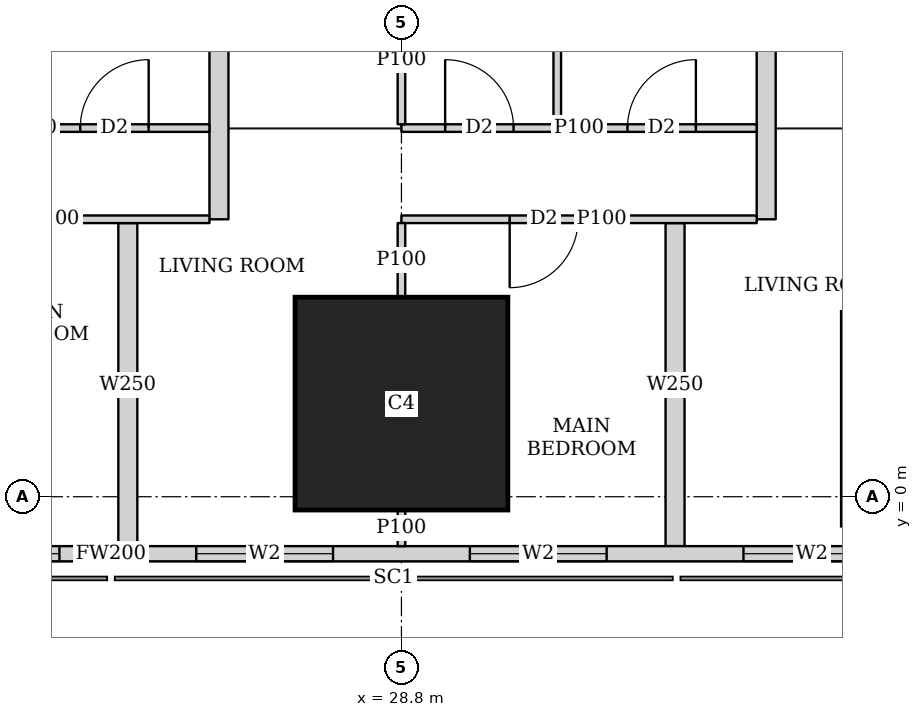
"""IFC4 building model, lengths in metres.
Left out: names, types, materials, properties, quantities, classifications, styles, units other than length and angle.
Written with IfcOpenShell. Run it as: python <this file> out.ifc"""

import sys

from ifc_helpers import new_model, si_unit, direction, frame, frame_2d, origin, origin_2d, place, context, subcontext, project, spatial, rectangle, extrude, element, fill, save


model = new_model("IFC4")
c1 = context("Model", 3, precision=1e-05, world=origin(), true_north=direction((0.0, 1.0)))
c2 = subcontext(c1, "Body", "Model", "MODEL_VIEW")
j1 = project(units=[si_unit("LENGTHUNIT", "METRE"), si_unit("PLANEANGLEUNIT", "RADIAN")], contexts=[c1])
p1 = place(None, origin())
s1 = spatial("IfcSite", under=j1, at=p1, CompositionType="ELEMENT")
p2 = place(p1, origin())
s2 = spatial("IfcBuilding", under=s1, at=p2, CompositionType="ELEMENT")
p3 = place(p2, frame((0.0, 0.0, 68.75)))
s3 = spatial("IfcBuildingStorey", under=s2, at=p3, CompositionType="ELEMENT", Elevation=68.75)
p4 = place(p3, frame((28.8, 1.225, 0.0), z_axis=(0.0, 0.0, 1.0), x_axis=(1.0, 0.0, 0.0)))
e1 = element("IfcColumn", 1, at=p4, inside=s3, PredefinedType="COLUMN", context=c2, shape_type="SweptSolid", body=[
    extrude(rectangle(XDim=2.8, YDim=2.8, at=origin_2d()), origin(), (0.0, 0.0, 1.0), 3.75),
])
p5 = place(p3, frame((2.163, -0.75, 0.0), z_axis=(0.0, 0.0, 1.0), x_axis=(1.0, 0.0, 0.0)))
e2 = element("IfcWall", 2, at=p5, inside=s3, PredefinedType="SOLIDWALL", context=c2, shape_type="SweptSolid", body=[
    extrude(rectangle(XDim=45.628, YDim=0.2, at=frame_2d((22.814, 0.0))), origin(), (0.0, 0.0, 1.0), 3.45),
])
p6 = place(p5, frame((9.537, 0.0, 0.9)))
e3 = element("IfcOpeningElement", 3, at=p6, cuts=e2, PredefinedType="OPENING", context=c2, shape_type="SweptSolid", body=[
    extrude(rectangle(XDim=1.8, YDim=1.5, at=frame_2d((0.9, 0.75))), frame((0.0, 0.11, 0.0), z_axis=(0.0, -1.0, 0.0), x_axis=(1.0, 0.0, 0.0)), (0.0, 0.0, 1.0), 0.22),
])
p7 = place(p5, frame((13.137, 0.0, 0.9)))
e4 = element("IfcOpeningElement", 4, at=p7, cuts=e2, PredefinedType="OPENING", context=c2, shape_type="SweptSolid", body=[
    extrude(rectangle(XDim=1.8, YDim=1.5, at=frame_2d((0.9, 0.75))), frame((0.0, 0.11, 0.0), z_axis=(0.0, -1.0, 0.0), x_axis=(1.0, 0.0, 0.0)), (0.0, 0.0, 1.0), 0.22),
])
p8 = place(p5, frame((16.737, 0.0, 0.9)))
e5 = element("IfcOpeningElement", 5, at=p8, cuts=e2, PredefinedType="OPENING", context=c2, shape_type="SweptSolid", body=[
    extrude(rectangle(XDim=1.8, YDim=1.5, at=frame_2d((0.9, 0.75))), frame((0.0, 0.11, 0.0), z_axis=(0.0, -1.0, 0.0), x_axis=(1.0, 0.0, 0.0)), (0.0, 0.0, 1.0), 0.22),
])
p9 = place(p5, frame((20.337, 0.0, 0.9)))
e6 = element("IfcOpeningElement", 6, at=p9, cuts=e2, PredefinedType="OPENING", context=c2, shape_type="SweptSolid", body=[
    extrude(rectangle(XDim=1.8, YDim=1.5, at=frame_2d((0.9, 0.75))), frame((0.0, 0.11, 0.0), z_axis=(0.0, -1.0, 0.0), x_axis=(1.0, 0.0, 0.0)), (0.0, 0.0, 1.0), 0.22),
])
p10 = place(p5, frame((23.937, 0.0, 0.9)))
e7 = element("IfcOpeningElement", 7, at=p10, cuts=e2, PredefinedType="OPENING", context=c2, shape_type="SweptSolid", body=[
    extrude(rectangle(XDim=1.8, YDim=1.5, at=frame_2d((0.9, 0.75))), frame((0.0, 0.11, 0.0), z_axis=(0.0, -1.0, 0.0), x_axis=(1.0, 0.0, 0.0)), (0.0, 0.0, 1.0), 0.22),
])
p11 = place(p5, frame((27.537, 0.0, 0.9)))
e8 = element("IfcOpeningElement", 8, at=p11, cuts=e2, PredefinedType="OPENING", context=c2, shape_type="SweptSolid", body=[
    extrude(rectangle(XDim=1.8, YDim=1.5, at=frame_2d((0.9, 0.75))), frame((0.0, 0.11, 0.0), z_axis=(0.0, -1.0, 0.0), x_axis=(1.0, 0.0, 0.0)), (0.0, 0.0, 1.0), 0.22),
])
p12 = place(p5, frame((31.137, 0.0, 0.9)))
e9 = element("IfcOpeningElement", 9, at=p12, cuts=e2, PredefinedType="OPENING", context=c2, shape_type="SweptSolid", body=[
    extrude(rectangle(XDim=1.8, YDim=1.5, at=frame_2d((0.9, 0.75))), frame((0.0, 0.11, 0.0), z_axis=(0.0, -1.0, 0.0), x_axis=(1.0, 0.0, 0.0)), (0.0, 0.0, 1.0), 0.22),
])
p13 = place(p5, frame((34.737, 0.0, 0.9)))
e10 = element("IfcOpeningElement", 10, at=p13, cuts=e2, PredefinedType="OPENING", context=c2, shape_type="SweptSolid", body=[
    extrude(rectangle(XDim=1.8, YDim=1.5, at=frame_2d((0.9, 0.75))), frame((0.0, 0.11, 0.0), z_axis=(0.0, -1.0, 0.0), x_axis=(1.0, 0.0, 0.0)), (0.0, 0.0, 1.0), 0.22),
])
p14 = place(p3, frame((33.68, 42.723, 0.0), z_axis=(0.0, 0.0, 1.0), x_axis=(0.185624129307, -0.98262082342, 0.0)))
e11 = element("IfcWall", 11, at=p14, inside=s3, PredefinedType="SOLIDWALL", context=c2, shape_type="SweptSolid", body=[
    extrude(rectangle(XDim=41.051, YDim=0.15, at=frame_2d((20.526, 0.0))), origin(), (0.0, 0.0, 1.0), 2.45),
])
p15 = place(p14, frame((13.577, 0.0, 0.0)))
e12 = element("IfcOpeningElement", 12, at=p15, cuts=e11, PredefinedType="OPENING", context=c2, shape_type="SweptSolid", body=[
    extrude(rectangle(XDim=1.0, YDim=2.1, at=frame_2d((0.5, 1.05))), frame((0.0, 0.085, 0.0), z_axis=(0.0, -1.0, 0.0), x_axis=(1.0, 0.0, 0.0)), (0.0, 0.0, 1.0), 0.17),
])
p16 = place(p14, frame((17.394, 0.0, 0.0)))
e13 = element("IfcOpeningElement", 13, at=p16, cuts=e11, PredefinedType="OPENING", context=c2, shape_type="SweptSolid", body=[
    extrude(rectangle(XDim=1.0, YDim=2.1, at=frame_2d((0.5, 1.05))), frame((0.0, 0.085, 0.0), z_axis=(0.0, -1.0, 0.0), x_axis=(1.0, 0.0, 0.0)), (0.0, 0.0, 1.0), 0.17),
])
p17 = place(p14, frame((26.758, 0.0, 0.0)))
e14 = element("IfcOpeningElement", 14, at=p17, cuts=e11, PredefinedType="OPENING", context=c2, shape_type="SweptSolid", body=[
    extrude(rectangle(XDim=1.0, YDim=2.1, at=frame_2d((0.5, 1.05))), frame((0.0, 0.085, 0.0), z_axis=(0.0, -1.0, 0.0), x_axis=(1.0, 0.0, 0.0)), (0.0, 0.0, 1.0), 0.17),
])
p18 = place(p14, frame((32.193, 0.0, 0.0)))
e15 = element("IfcOpeningElement", 15, at=p18, cuts=e11, PredefinedType="OPENING", context=c2, shape_type="SweptSolid", body=[
    extrude(rectangle(XDim=1.0, YDim=2.1, at=frame_2d((0.5, 1.05))), frame((0.0, 0.085, 0.0), z_axis=(0.0, -1.0, 0.0), x_axis=(1.0, 0.0, 0.0)), (0.0, 0.0, 1.0), 0.17),
])
p19 = place(p3, frame((26.274, 3.65, 0.0), z_axis=(0.0, 0.0, 1.0), x_axis=(-1.0, 0.0, 0.0)))
e16 = element("IfcWall", 16, at=p19, inside=s3, PredefinedType="PARTITIONING", context=c2, shape_type="SweptSolid", body=[
    extrude(rectangle(XDim=4.674, YDim=0.1, at=frame_2d((2.337, 0.0))), origin(), (0.0, 0.0, 1.0), 3.45),
])
p20 = place(p19, frame((2.35, 0.0, 0.0)))
e17 = element("IfcOpeningElement", 17, at=p20, cuts=e16, PredefinedType="OPENING", context=c2, shape_type="SweptSolid", body=[
    extrude(rectangle(XDim=0.9, YDim=2.1, at=frame_2d((0.45, 1.05))), frame((0.0, 0.06, 0.0), z_axis=(0.0, -1.0, 0.0), x_axis=(1.0, 0.0, 0.0)), (0.0, 0.0, 1.0), 0.12),
])
p21 = place(p3, frame((26.274, 4.85, 0.0), z_axis=(0.0, 0.0, 1.0), x_axis=(-1.0, 0.0, 0.0)))
e18 = element("IfcWall", 18, at=p21, inside=s3, PredefinedType="PARTITIONING", context=c2, shape_type="SweptSolid", body=[
    extrude(rectangle(XDim=4.674, YDim=0.1, at=frame_2d((2.337, 0.0))), origin(), (0.0, 0.0, 1.0), 3.45),
])
p22 = place(p21, frame((3.199, 0.0, 0.0)))
e19 = element("IfcOpeningElement", 19, at=p22, cuts=e18, PredefinedType="OPENING", context=c2, shape_type="SweptSolid", body=[
    extrude(rectangle(XDim=0.9, YDim=2.1, at=frame_2d((0.45, 1.05))), frame((0.0, 0.06, 0.0), z_axis=(0.0, -1.0, 0.0), x_axis=(1.0, 0.0, 0.0)), (0.0, 0.0, 1.0), 0.12),
])
p23 = place(p21, frame((0.8, 0.0, 0.0)))
e20 = element("IfcOpeningElement", 20, at=p23, cuts=e18, PredefinedType="OPENING", context=c2, shape_type="SweptSolid", body=[
    extrude(rectangle(XDim=0.9, YDim=2.1, at=frame_2d((0.45, 1.05))), frame((0.0, 0.06, 0.0), z_axis=(0.0, -1.0, 0.0), x_axis=(1.0, 0.0, 0.0)), (0.0, 0.0, 1.0), 0.12),
])
p24 = place(p3, frame((33.474, 3.65, 0.0), z_axis=(0.0, 0.0, 1.0), x_axis=(-1.0, 0.0, 0.0)))
e21 = element("IfcWall", 21, at=p24, inside=s3, PredefinedType="PARTITIONING", context=c2, shape_type="SweptSolid", body=[
    extrude(rectangle(XDim=4.674, YDim=0.1, at=frame_2d((2.337, 0.0))), origin(), (0.0, 0.0, 1.0), 3.45),
])
p25 = place(p24, frame((2.35, 0.0, 0.0)))
e22 = element("IfcOpeningElement", 22, at=p25, cuts=e21, PredefinedType="OPENING", context=c2, shape_type="SweptSolid", body=[
    extrude(rectangle(XDim=0.9, YDim=2.1, at=frame_2d((0.45, 1.05))), frame((0.0, 0.06, 0.0), z_axis=(0.0, -1.0, 0.0), x_axis=(1.0, 0.0, 0.0)), (0.0, 0.0, 1.0), 0.12),
])
p26 = place(p3, frame((33.474, 4.85, 0.0), z_axis=(0.0, 0.0, 1.0), x_axis=(-1.0, 0.0, 0.0)))
e23 = element("IfcWall", 23, at=p26, inside=s3, PredefinedType="PARTITIONING", context=c2, shape_type="SweptSolid", body=[
    extrude(rectangle(XDim=4.674, YDim=0.1, at=frame_2d((2.337, 0.0))), origin(), (0.0, 0.0, 1.0), 3.45),
])
p27 = place(p26, frame((3.199, 0.0, 0.0)))
e24 = element("IfcOpeningElement", 24, at=p27, cuts=e23, PredefinedType="OPENING", context=c2, shape_type="SweptSolid", body=[
    extrude(rectangle(XDim=0.9, YDim=2.1, at=frame_2d((0.45, 1.05))), frame((0.0, 0.06, 0.0), z_axis=(0.0, -1.0, 0.0), x_axis=(1.0, 0.0, 0.0)), (0.0, 0.0, 1.0), 0.12),
])
p28 = place(p26, frame((0.8, 0.0, 0.0)))
e25 = element("IfcOpeningElement", 25, at=p28, cuts=e23, PredefinedType="OPENING", context=c2, shape_type="SweptSolid", body=[
    extrude(rectangle(XDim=0.9, YDim=2.1, at=frame_2d((0.45, 1.05))), frame((0.0, 0.06, 0.0), z_axis=(0.0, -1.0, 0.0), x_axis=(1.0, 0.0, 0.0)), (0.0, 0.0, 1.0), 0.12),
])
p29 = place(p3, frame((28.8, -0.65, 0.0), z_axis=(0.0, 0.0, 1.0), x_axis=(0.0, 1.0, 0.0)))
e26 = element("IfcWall", 26, at=p29, inside=s3, PredefinedType="PARTITIONING", context=c2, shape_type="SweptSolid", body=[
    extrude(rectangle(XDim=0.474, YDim=0.1, at=frame_2d((0.237, 0.0))), origin(), (0.0, 0.0, 1.0), 3.45),
])
p30 = place(p3, frame((28.8, 2.626, 0.0), z_axis=(0.0, 0.0, 1.0), x_axis=(0.0, 1.0, 0.0)))
e27 = element("IfcWall", 27, at=p30, inside=s3, PredefinedType="PARTITIONING", context=c2, shape_type="SweptSolid", body=[
    extrude(rectangle(XDim=0.974, YDim=0.1, at=frame_2d((0.487, 0.0))), origin(), (0.0, 0.0, 1.0), 3.45),
])
p31 = place(p3, frame((28.8, 4.9, 0.0), z_axis=(0.0, 0.0, 1.0), x_axis=(0.0, 1.0, 0.0)))
e28 = element("IfcWall", 28, at=p31, inside=s3, PredefinedType="PARTITIONING", context=c2, shape_type="SweptSolid", body=[
    extrude(rectangle(XDim=1.699, YDim=0.1, at=frame_2d((0.85, 0.0))), origin(), (0.0, 0.0, 1.0), 3.45),
])
p32 = place(p3, frame((30.85, 4.9, 0.0), z_axis=(0.0, 0.0, 1.0), x_axis=(0.0, 1.0, 0.0)))
e29 = element("IfcWall", 29, at=p32, inside=s3, PredefinedType="PARTITIONING", context=c2, shape_type="SweptSolid", body=[
    extrude(rectangle(XDim=3.525, YDim=0.1, at=frame_2d((1.763, 0.0))), origin(), (0.0, 0.0, 1.0), 3.45),
])
p33 = place(p3, frame((25.2, -0.65, 0.0), z_axis=(0.0, 0.0, 1.0), x_axis=(0.0, 1.0, 0.0)))
e30 = element("IfcWall", 30, at=p33, inside=s3, PredefinedType="SOLIDWALL", context=c2, shape_type="SweptSolid", body=[
    extrude(rectangle(XDim=4.25, YDim=0.25, at=frame_2d((2.125, 0.0))), origin(), (0.0, 0.0, 1.0), 2.0),
])
p34 = place(p3, frame((26.399, 3.65, 0.0), z_axis=(0.0, 0.0, 1.0), x_axis=(0.0, 1.0, 0.0)))
e31 = element("IfcWall", 31, at=p34, inside=s3, PredefinedType="SOLIDWALL", context=c2, shape_type="SweptSolid", body=[
    extrude(rectangle(XDim=4.775, YDim=0.25, at=frame_2d((2.388, 0.0))), origin(), (0.0, 0.0, 1.0), 3.45),
])
p35 = place(p3, frame((32.4, -0.65, 0.0), z_axis=(0.0, 0.0, 1.0), x_axis=(0.0, 1.0, 0.0)))
e32 = element("IfcWall", 32, at=p35, inside=s3, PredefinedType="SOLIDWALL", context=c2, shape_type="SweptSolid", body=[
    extrude(rectangle(XDim=4.25, YDim=0.25, at=frame_2d((2.125, 0.0))), origin(), (0.0, 0.0, 1.0), 2.0),
])
p36 = place(p3, frame((33.599, 3.65, 0.0), z_axis=(0.0, 0.0, 1.0), x_axis=(0.0, 1.0, 0.0)))
e33 = element("IfcWall", 33, at=p36, inside=s3, PredefinedType="SOLIDWALL", context=c2, shape_type="SweptSolid", body=[
    extrude(rectangle(XDim=4.775, YDim=0.25, at=frame_2d((2.388, 0.0))), origin(), (0.0, 0.0, 1.0), 3.45),
])
p37 = place(p9, origin())
e34 = element("IfcWindow", 34, at=p37, inside=s3, PartitioningType="SINGLE_PANEL", PredefinedType="WINDOW", context=c2, shape_type="SweptSolid", body=[
    extrude(rectangle(XDim=1.8, YDim=1.5, at=frame_2d((0.9, 0.75))), frame((0.0, 0.03, 0.0), z_axis=(0.0, -1.0, 0.0), x_axis=(1.0, 0.0, 0.0)), (0.0, 0.0, 1.0), 0.06),
])
fill(e6, e34)
p38 = place(p10, origin())
e35 = element("IfcWindow", 35, at=p38, inside=s3, PartitioningType="SINGLE_PANEL", PredefinedType="WINDOW", context=c2, shape_type="SweptSolid", body=[
    extrude(rectangle(XDim=1.8, YDim=1.5, at=frame_2d((0.9, 0.75))), frame((0.0, 0.03, 0.0), z_axis=(0.0, -1.0, 0.0), x_axis=(1.0, 0.0, 0.0)), (0.0, 0.0, 1.0), 0.06),
])
fill(e7, e35)
p39 = place(p11, origin())
e36 = element("IfcWindow", 36, at=p39, inside=s3, PartitioningType="SINGLE_PANEL", PredefinedType="WINDOW", context=c2, shape_type="SweptSolid", body=[
    extrude(rectangle(XDim=1.8, YDim=1.5, at=frame_2d((0.9, 0.75))), frame((0.0, 0.03, 0.0), z_axis=(0.0, -1.0, 0.0), x_axis=(1.0, 0.0, 0.0)), (0.0, 0.0, 1.0), 0.06),
])
fill(e8, e36)
p40 = place(p12, origin())
e37 = element("IfcWindow", 37, at=p40, inside=s3, PartitioningType="SINGLE_PANEL", PredefinedType="WINDOW", context=c2, shape_type="SweptSolid", body=[
    extrude(rectangle(XDim=1.8, YDim=1.5, at=frame_2d((0.9, 0.75))), frame((0.0, 0.03, 0.0), z_axis=(0.0, -1.0, 0.0), x_axis=(1.0, 0.0, 0.0)), (0.0, 0.0, 1.0), 0.06),
])
fill(e9, e37)
p41 = place(p23, origin())
e38 = element("IfcDoor", 38, at=p41, inside=s3, OperationType="SINGLE_SWING_RIGHT", PredefinedType="DOOR", context=c2, shape_type="SweptSolid", body=[
    extrude(rectangle(XDim=0.9, YDim=2.1, at=frame_2d((0.45, 1.05))), frame((0.0, 0.025, 0.0), z_axis=(0.0, -1.0, 0.0), x_axis=(1.0, 0.0, 0.0)), (0.0, 0.0, 1.0), 0.05),
])
fill(e20, e38)
p42 = place(p25, origin())
e39 = element("IfcDoor", 39, at=p42, inside=s3, OperationType="SINGLE_SWING_RIGHT", PredefinedType="DOOR", context=c2, shape_type="SweptSolid", body=[
    extrude(rectangle(XDim=0.9, YDim=2.1, at=frame_2d((0.45, 1.05))), frame((0.0, 0.025, 0.0), z_axis=(0.0, -1.0, 0.0), x_axis=(1.0, 0.0, 0.0)), (0.0, 0.0, 1.0), 0.05),
])
fill(e22, e39)
p43 = place(p27, origin())
e40 = element("IfcDoor", 40, at=p43, inside=s3, OperationType="SINGLE_SWING_LEFT", PredefinedType="DOOR", context=c2, shape_type="SweptSolid", body=[
    extrude(rectangle(XDim=0.9, YDim=2.1, at=frame_2d((0.45, 1.05))), frame((0.0, 0.025, 0.0), z_axis=(0.0, -1.0, 0.0), x_axis=(1.0, 0.0, 0.0)), (0.0, 0.0, 1.0), 0.05),
])
fill(e24, e40)
p44 = place(p28, origin())
e41 = element("IfcDoor", 41, at=p44, inside=s3, OperationType="SINGLE_SWING_RIGHT", PredefinedType="DOOR", context=c2, shape_type="SweptSolid", body=[
    extrude(rectangle(XDim=0.9, YDim=2.1, at=frame_2d((0.45, 1.05))), frame((0.0, 0.025, 0.0), z_axis=(0.0, -1.0, 0.0), x_axis=(1.0, 0.0, 0.0)), (0.0, 0.0, 1.0), 0.05),
])
fill(e25, e41)
save(model, sys.argv[1])
